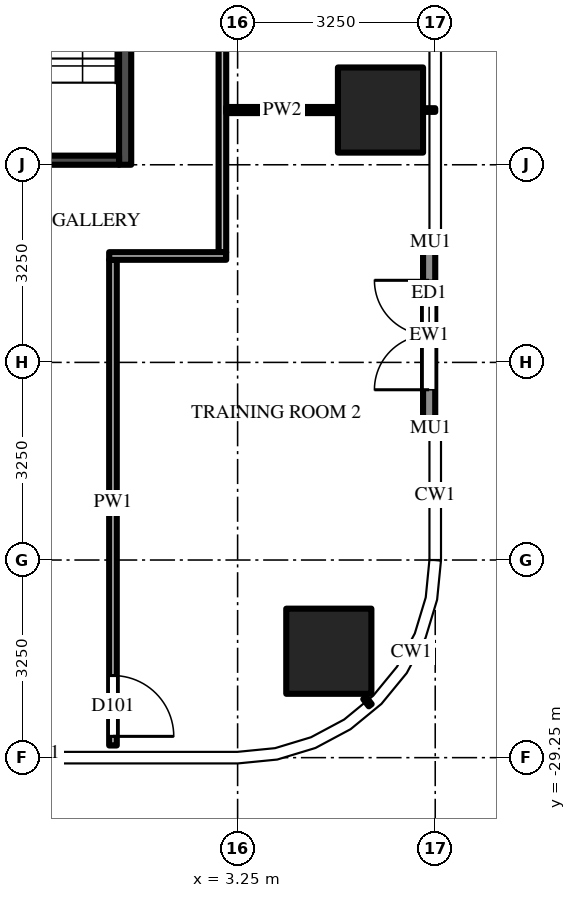
"""IFC4 building model, lengths in metres.
Left out: names, types, materials, properties, quantities, classifications, styles, units other than length and angle.
Written with IfcOpenShell. Run it as: python <this file> out.ifc"""

import sys

from ifc_helpers import new_model, si_unit, direction, frame, frame_2d, origin, origin_2d, place, context, subcontext, project, spatial, rectangle, extrude, source, transform, mapped, element, fill, save


model = new_model("IFC4")
c1 = context("Model", 3, precision=1e-05, world=origin(), true_north=direction((0.0, 1.0)))
c2 = subcontext(c1, "Body", "Model", "MODEL_VIEW")
j1 = project(units=[si_unit("LENGTHUNIT", "METRE"), si_unit("PLANEANGLEUNIT", "RADIAN")], contexts=[c1])
p1 = place(None, origin())
s1 = spatial("IfcSite", under=j1, at=p1, CompositionType="ELEMENT")
p2 = place(p1, origin())
s2 = spatial("IfcBuilding", under=s1, at=p2, CompositionType="ELEMENT")
p3 = place(p2, frame((0.0, 0.0, 70.0)))
s3 = spatial("IfcBuildingStorey", under=s2, at=p3, CompositionType="ELEMENT", Elevation=70.0)
m1 = source(origin(), c2, "Body", "SweptSolid", [
    extrude(rectangle(XDim=1.4, YDim=1.4, at=origin_2d()), origin(), (0.0, 0.0, 1.0), 4.5),
])
for number, where, z_axis, x_axis in (
    (1, (5.6, -18.6, 0.0), (0.0, 0.0, 1.0), (1.0, 0.0, 0.0)),
    (2, (4.75, -27.5, 0.0), (0.0, 0.0, 1.0), (1.0, 0.0, 0.0)),
):
    element("IfcColumn", number, at=place(p3, frame(where, z_axis=z_axis, x_axis=x_axis)), inside=s3, PredefinedType="COLUMN", context=c2, shape_type="MappedRepresentation", body=[
        mapped(m1, transform((0.0, 0.0, 0.0))),
    ])
m2 = source(origin(), c2, "Body", "SweptSolid", [
    extrude(rectangle(XDim=6.0, YDim=0.2, at=frame_2d((3.0, 0.0))), origin(), (0.0, 0.0, 1.0), 4.25),
])
p4 = place(p3, frame((1.4, -13.5, 0.0), z_axis=(0.0, 0.0, 1.0), x_axis=(0.0, -1.0, 0.0)))
e3 = element("IfcWall", 3, at=p4, inside=s3, PredefinedType="SHEAR", context=c2, shape_type="MappedRepresentation", body=[
    mapped(m2, transform((0.0, 0.0, 0.0))),
])
m3 = source(origin(), c2, "Body", "SweptSolid", [
    extrude(rectangle(XDim=2.6, YDim=0.15, at=frame_2d((1.3, 0.0))), origin(), (0.0, 0.0, 1.0), 4.25),
])
p5 = place(p3, frame((1.3, -19.425, 0.0), z_axis=(0.0, 0.0, 1.0), x_axis=(-1.0, 0.0, 0.0)))
e4 = element("IfcWall", 4, at=p5, inside=s3, PredefinedType="SHEAR", context=c2, shape_type="MappedRepresentation", body=[
    mapped(m3, transform((0.0, 0.0, 0.0))),
])
m4 = source(origin(), c2, "Body", "SweptSolid", [
    extrude(rectangle(XDim=3.0, YDim=0.2, at=frame_2d((1.5, 0.0))), origin(), (0.0, 0.0, 1.0), 4.25),
])
p6 = place(p3, frame((6.4, -23.8, 0.0), z_axis=(0.0, 0.0, 1.0), x_axis=(0.0, 1.0, 0.0)))
e5 = element("IfcWall", 5, at=p6, inside=s3, PredefinedType="SOLIDWALL", context=c2, shape_type="MappedRepresentation", body=[
    mapped(m4, transform((0.0, 0.0, 0.0))),
])
m5 = source(origin(), c2, "Body", "SweptSolid", [
    extrude(rectangle(XDim=1.8, YDim=2.4, at=frame_2d((0.9, 1.2))), frame((0.0, 0.11, 0.0), z_axis=(0.0, -1.0, 0.0), x_axis=(1.0, 0.0, 0.0)), (0.0, 0.0, 1.0), 0.22),
])
p7 = place(p6, frame((0.6, 0.0, 0.0)))
e6 = element("IfcOpeningElement", 6, at=p7, cuts=e5, PredefinedType="OPENING", context=c2, shape_type="MappedRepresentation", body=[
    mapped(m5, transform((0.0, 0.0, 0.0))),
])
m6 = source(origin(), c2, "Body", "SweptSolid", [
    extrude(rectangle(XDim=7.988, YDim=0.125, at=frame_2d((3.994, 0.0))), origin(), (0.0, 0.0, 1.0), 3.33),
])
p8 = place(p3, frame((1.2, -21.062, 0.0), z_axis=(0.0, 0.0, 1.0), x_axis=(0.0, -1.0, 0.0)))
e7 = element("IfcWall", 7, at=p8, inside=s3, PredefinedType="PARTITIONING", context=c2, shape_type="MappedRepresentation", body=[
    mapped(m6, transform((0.0, 0.0, 0.0))),
])
m7 = source(origin(), c2, "Body", "SweptSolid", [
    extrude(rectangle(XDim=1.0, YDim=2.1, at=frame_2d((0.5, 1.05))), frame((0.0, 0.073, 0.0), z_axis=(0.0, -1.0, 0.0), x_axis=(1.0, 0.0, 0.0)), (0.0, 0.0, 1.0), 0.145),
])
p9 = place(p8, frame((6.837, 0.0, 0.0)))
e8 = element("IfcOpeningElement", 8, at=p9, cuts=e7, PredefinedType="OPENING", context=c2, shape_type="MappedRepresentation", body=[
    mapped(m7, transform((0.0, 0.0, 0.0))),
])
m8 = source(origin(), c2, "Body", "SweptSolid", [
    extrude(rectangle(XDim=8.788, YDim=0.125, at=frame_2d((4.394, 0.0))), origin(), (0.0, 0.0, 1.0), 3.468),
])
p10 = place(p3, frame((3.0, -12.15, 0.0), z_axis=(0.0, 0.0, 1.0), x_axis=(0.0, -1.0, 0.0)))
e9 = element("IfcWall", 9, at=p10, inside=s3, PredefinedType="PARTITIONING", context=c2, shape_type="MappedRepresentation", body=[
    mapped(m8, transform((0.0, 0.0, 0.0))),
])
p11 = place(p10, frame((1.7, 0.0, 0.0)))
e10 = element("IfcOpeningElement", 10, at=p11, cuts=e9, PredefinedType="OPENING", context=c2, shape_type="MappedRepresentation", body=[
    mapped(m7, transform((0.0, 0.0, 0.0))),
])
m9 = source(origin(), c2, "Body", "SweptSolid", [
    extrude(rectangle(XDim=1.925, YDim=0.125, at=frame_2d((0.962, 0.0))), origin(), (0.0, 0.0, 1.0), 4.25),
])
p12 = place(p3, frame((3.062, -21.0, 0.0), z_axis=(0.0, 0.0, 1.0), x_axis=(-1.0, 0.0, 0.0)))
e11 = element("IfcWall", 11, at=p12, inside=s3, PredefinedType="PARTITIONING", context=c2, shape_type="MappedRepresentation", body=[
    mapped(m9, transform((0.0, 0.0, 0.0))),
])
m10 = source(origin(), c2, "Body", "SweptSolid", [
    extrude(rectangle(XDim=1.837, YDim=0.1, at=frame_2d((0.919, 0.0))), origin(), (0.0, 0.0, 1.0), 3.697),
])
p13 = place(p3, frame((3.062, -18.6, 0.0), z_axis=(0.0, 0.0, 1.0), x_axis=(1.0, 0.0, 0.0)))
e12 = element("IfcWall", 12, at=p13, inside=s3, PredefinedType="PARTITIONING", context=c2, shape_type="MappedRepresentation", body=[
    mapped(m10, transform((0.0, 0.0, 0.0))),
])
m11 = source(origin(), c2, "Body", "SweptSolid", [
    extrude(rectangle(XDim=1.8, YDim=2.4, at=frame_2d((0.9, 1.2))), frame((0.0, 0.025, 0.0), z_axis=(0.0, -1.0, 0.0), x_axis=(1.0, 0.0, 0.0)), (0.0, 0.0, 1.0), 0.05),
])
p14 = place(p7, origin())
e13 = element("IfcDoor", 13, at=p14, inside=s3, OperationType="DOUBLE_DOOR_SINGLE_SWING", PredefinedType="DOOR", context=c2, shape_type="MappedRepresentation", body=[
    mapped(m11, transform((0.0, 0.0, 0.0))),
])
fill(e6, e13)
m12 = source(origin(), c2, "Body", "SweptSolid", [
    extrude(rectangle(XDim=1.0, YDim=2.1, at=frame_2d((0.5, 1.05))), frame((0.0, 0.025, 0.0), z_axis=(0.0, -1.0, 0.0), x_axis=(1.0, 0.0, 0.0)), (0.0, 0.0, 1.0), 0.05),
])
p15 = place(p9, origin())
e14 = element("IfcDoor", 14, at=p15, inside=s3, OperationType="SINGLE_SWING_RIGHT", PredefinedType="DOOR", context=c2, shape_type="MappedRepresentation", body=[
    mapped(m12, transform((0.0, 0.0, 0.0))),
])
fill(e8, e14)
save(model, sys.argv[1])
